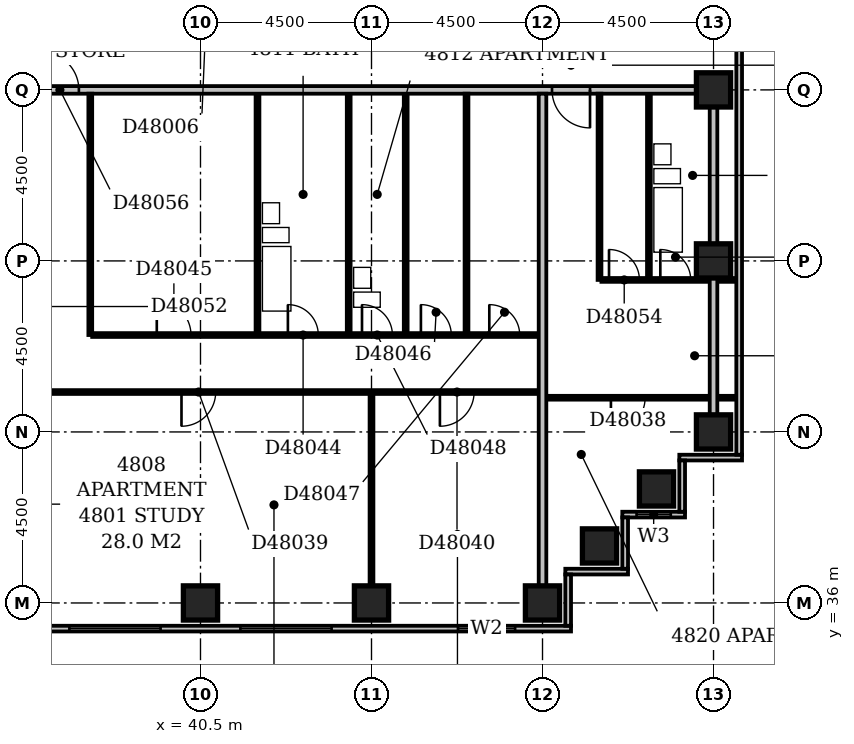
"""IFC4 building model, lengths in metres.
Left out: names, types, materials, properties, quantities, classifications, styles, units other than length and angle.
Written with IfcOpenShell. Run it as: python <this file> out.ifc"""

import sys

from ifc_helpers import new_model, si_unit, direction, frame, frame_2d, origin, origin_2d, place, context, subcontext, project, spatial, rectangle, extrude, element, fill, save


model = new_model("IFC4")
c1 = context("Model", 3, precision=1e-05, world=origin(), true_north=direction((0.0, 1.0)))
c2 = subcontext(c1, "Body", "Model", "MODEL_VIEW")
j1 = project(units=[si_unit("LENGTHUNIT", "METRE"), si_unit("PLANEANGLEUNIT", "RADIAN")], contexts=[c1])
p1 = place(None, origin())
s1 = spatial("IfcSite", under=j1, at=p1, CompositionType="ELEMENT")
p2 = place(p1, origin())
s2 = spatial("IfcBuilding", under=s1, at=p2, CompositionType="ELEMENT")
p3 = place(p2, frame((0.0, 0.0, 189.8)))
s3 = spatial("IfcBuildingStorey", under=s2, at=p3, CompositionType="ELEMENT", Elevation=189.8)
for number, where, z_axis, x_axis in (
    (1, (40.5, 36.0, -0.3), (0.0, 0.0, 1.0), (1.0, 0.0, 0.0)),
    (2, (45.0, 36.0, -0.3), (0.0, 0.0, 1.0), (1.0, 0.0, 0.0)),
    (3, (49.5, 36.0, -0.3), (0.0, 0.0, 1.0), (1.0, 0.0, 0.0)),
    (4, (51.0, 37.5, -0.3), (0.0, 0.0, 1.0), (1.0, 0.0, 0.0)),
    (5, (52.5, 39.0, -0.3), (0.0, 0.0, 1.0), (1.0, 0.0, 0.0)),
    (6, (54.0, 40.5, -0.3), (0.0, 0.0, 1.0), (1.0, 0.0, 0.0)),
    (7, (54.0, 45.0, -0.3), (0.0, 0.0, 1.0), (1.0, 0.0, 0.0)),
    (8, (54.0, 49.5, -0.3), (0.0, 0.0, 1.0), (1.0, 0.0, 0.0)),
):
    element("IfcColumn", number, at=place(p3, frame(where, z_axis=z_axis, x_axis=x_axis)), inside=s3, PredefinedType="COLUMN", context=c2, shape_type="SweptSolid", body=[
        extrude(rectangle(XDim=0.9, YDim=0.9, at=origin_2d()), origin(), (0.0, 0.0, 1.0), 3.6),
    ])
p4 = place(p3, frame((23.1, 35.325, 0.0), z_axis=(0.0, 0.0, 1.0), x_axis=(1.0, 0.0, 0.0)))
e9 = element("IfcWall", 9, at=p4, inside=s3, PredefinedType="STANDARD", context=c2, shape_type="SweptSolid", body=[
    extrude(rectangle(XDim=27.15, YDim=0.15, at=frame_2d((13.575, 0.0))), origin(), (0.0, 0.0, 1.0), 2.7),
])
p5 = place(p4, frame((0.285, 0.0, 0.6)))
e10 = element("IfcOpeningElement", 10, at=p5, cuts=e9, PredefinedType="OPENING", context=c2, shape_type="SweptSolid", body=[
    extrude(rectangle(XDim=2.1, YDim=1.8, at=frame_2d((1.05, 0.9))), frame((0.0, 0.087, 0.0), z_axis=(0.0, -1.0, 0.0), x_axis=(1.0, 0.0, 0.0)), (0.0, 0.0, 1.0), 0.174),
])
p6 = place(p4, frame((4.95, 0.0, 0.6)))
e11 = element("IfcOpeningElement", 11, at=p6, cuts=e9, PredefinedType="OPENING", context=c2, shape_type="SweptSolid", body=[
    extrude(rectangle(XDim=2.4, YDim=1.8, at=frame_2d((1.2, 0.9))), frame((0.0, 0.087, 0.0), z_axis=(0.0, -1.0, 0.0), x_axis=(1.0, 0.0, 0.0)), (0.0, 0.0, 1.0), 0.174),
])
p7 = place(p4, frame((9.45, 0.0, 0.6)))
e12 = element("IfcOpeningElement", 12, at=p7, cuts=e9, PredefinedType="OPENING", context=c2, shape_type="SweptSolid", body=[
    extrude(rectangle(XDim=2.4, YDim=1.8, at=frame_2d((1.2, 0.9))), frame((0.0, 0.087, 0.0), z_axis=(0.0, -1.0, 0.0), x_axis=(1.0, 0.0, 0.0)), (0.0, 0.0, 1.0), 0.174),
])
p8 = place(p4, frame((13.95, 0.0, 0.6)))
e13 = element("IfcOpeningElement", 13, at=p8, cuts=e9, PredefinedType="OPENING", context=c2, shape_type="SweptSolid", body=[
    extrude(rectangle(XDim=2.4, YDim=1.8, at=frame_2d((1.2, 0.9))), frame((0.0, 0.087, 0.0), z_axis=(0.0, -1.0, 0.0), x_axis=(1.0, 0.0, 0.0)), (0.0, 0.0, 1.0), 0.174),
])
p9 = place(p4, frame((18.45, 0.0, 0.6)))
e14 = element("IfcOpeningElement", 14, at=p9, cuts=e9, PredefinedType="OPENING", context=c2, shape_type="SweptSolid", body=[
    extrude(rectangle(XDim=2.4, YDim=1.8, at=frame_2d((1.2, 0.9))), frame((0.0, 0.087, 0.0), z_axis=(0.0, -1.0, 0.0), x_axis=(1.0, 0.0, 0.0)), (0.0, 0.0, 1.0), 0.174),
])
p10 = place(p4, frame((24.179, 0.0, 0.6)))
e15 = element("IfcOpeningElement", 15, at=p10, cuts=e9, PredefinedType="OPENING", context=c2, shape_type="SweptSolid", body=[
    extrude(rectangle(XDim=1.5, YDim=1.8, at=frame_2d((0.75, 0.9))), frame((0.0, 0.087, 0.0), z_axis=(0.0, -1.0, 0.0), x_axis=(1.0, 0.0, 0.0)), (0.0, 0.0, 1.0), 0.174),
])
p11 = place(p3, frame((50.175, 35.4, 0.0), z_axis=(0.0, 0.0, 1.0), x_axis=(0.0, 1.0, 0.0)))
e16 = element("IfcWall", 16, at=p11, inside=s3, PredefinedType="STANDARD", context=c2, shape_type="SweptSolid", body=[
    extrude(rectangle(XDim=1.35, YDim=0.15, at=frame_2d((0.675, 0.0))), origin(), (0.0, 0.0, 1.0), 2.7),
])
p12 = place(p3, frame((50.1, 36.825, 0.0), z_axis=(0.0, 0.0, 1.0), x_axis=(1.0, 0.0, 0.0)))
e17 = element("IfcWall", 17, at=p12, inside=s3, PredefinedType="STANDARD", context=c2, shape_type="SweptSolid", body=[
    extrude(rectangle(XDim=1.65, YDim=0.15, at=frame_2d((0.825, 0.0))), origin(), (0.0, 0.0, 1.0), 2.7),
])
p13 = place(p3, frame((51.675, 36.9, 0.0), z_axis=(0.0, 0.0, 1.0), x_axis=(0.0, 1.0, 0.0)))
e18 = element("IfcWall", 18, at=p13, inside=s3, PredefinedType="STANDARD", context=c2, shape_type="SweptSolid", body=[
    extrude(rectangle(XDim=1.35, YDim=0.15, at=frame_2d((0.675, 0.0))), origin(), (0.0, 0.0, 1.0), 2.7),
])
p14 = place(p3, frame((51.6, 38.325, 0.0), z_axis=(0.0, 0.0, 1.0), x_axis=(1.0, 0.0, 0.0)))
e19 = element("IfcWall", 19, at=p14, inside=s3, PredefinedType="STANDARD", context=c2, shape_type="SweptSolid", body=[
    extrude(rectangle(XDim=1.65, YDim=0.15, at=frame_2d((0.825, 0.0))), origin(), (0.0, 0.0, 1.0), 2.7),
])
p15 = place(p14, frame((0.375, 0.0, 0.6)))
e20 = element("IfcOpeningElement", 20, at=p15, cuts=e19, PredefinedType="OPENING", context=c2, shape_type="SweptSolid", body=[
    extrude(rectangle(XDim=0.9, YDim=1.8, at=frame_2d((0.45, 0.9))), frame((0.0, 0.087, 0.0), z_axis=(0.0, -1.0, 0.0), x_axis=(1.0, 0.0, 0.0)), (0.0, 0.0, 1.0), 0.174),
])
p16 = place(p3, frame((53.175, 38.4, 0.0), z_axis=(0.0, 0.0, 1.0), x_axis=(0.0, 1.0, 0.0)))
e21 = element("IfcWall", 21, at=p16, inside=s3, PredefinedType="STANDARD", context=c2, shape_type="SweptSolid", body=[
    extrude(rectangle(XDim=1.35, YDim=0.15, at=frame_2d((0.675, 0.0))), origin(), (0.0, 0.0, 1.0), 2.7),
])
p17 = place(p3, frame((53.1, 39.825, 0.0), z_axis=(0.0, 0.0, 1.0), x_axis=(1.0, 0.0, 0.0)))
e22 = element("IfcWall", 22, at=p17, inside=s3, PredefinedType="STANDARD", context=c2, shape_type="SweptSolid", body=[
    extrude(rectangle(XDim=1.65, YDim=0.15, at=frame_2d((0.825, 0.0))), origin(), (0.0, 0.0, 1.0), 2.7),
])
p18 = place(p3, frame((54.675, 39.9, 0.0), z_axis=(0.0, 0.0, 1.0), x_axis=(0.0, 1.0, 0.0)))
e23 = element("IfcWall", 23, at=p18, inside=s3, PredefinedType="STANDARD", context=c2, shape_type="SweptSolid", body=[
    extrude(rectangle(XDim=14.85, YDim=0.15, at=frame_2d((7.425, 0.0))), origin(), (0.0, 0.0, 1.0), 2.7),
])
p19 = place(p3, frame((45.0, 36.45, 0.0), z_axis=(0.0, 0.0, 1.0), x_axis=(0.0, 1.0, 0.0)))
e24 = element("IfcWall", 24, at=p19, inside=s3, PredefinedType="PARTITIONING", context=c2, shape_type="SweptSolid", body=[
    extrude(rectangle(XDim=5.05, YDim=0.1, at=frame_2d((2.525, 0.0))), origin(), (0.0, 0.0, 1.0), 2.6),
])
p20 = place(p3, frame((49.5, 36.45, 0.0), z_axis=(0.0, 0.0, 1.0), x_axis=(0.0, 1.0, 0.0)))
e25 = element("IfcWall", 25, at=p20, inside=s3, PredefinedType="PARTITIONING", context=c2, shape_type="SweptSolid", body=[
    extrude(rectangle(XDim=12.95, YDim=0.2, at=frame_2d((6.475, 0.0))), origin(), (0.0, 0.0, 1.0), 3.3),
])
p21 = place(p3, frame((54.0, 40.95, 0.0), z_axis=(0.0, 0.0, 1.0), x_axis=(0.0, 1.0, 0.0)))
e26 = element("IfcWall", 26, at=p21, inside=s3, PredefinedType="PARTITIONING", context=c2, shape_type="SweptSolid", body=[
    extrude(rectangle(XDim=8.1, YDim=0.2, at=frame_2d((4.05, 0.0))), origin(), (0.0, 0.0, 1.0), 2.7),
])
p22 = place(p3, frame((49.6, 41.4, 0.0), z_axis=(0.0, 0.0, 1.0), x_axis=(1.0, 0.0, 0.0)))
e27 = element("IfcWall", 27, at=p22, inside=s3, PredefinedType="PARTITIONING", context=c2, shape_type="SweptSolid", body=[
    extrude(rectangle(XDim=5.0, YDim=0.1, at=frame_2d((2.5, 0.0))), origin(), (0.0, 0.0, 1.0), 3.3),
])
p23 = place(p22, frame((1.7, 0.0, 0.0)))
e28 = element("IfcOpeningElement", 28, at=p23, cuts=e27, PredefinedType="OPENING", context=c2, shape_type="SweptSolid", body=[
    extrude(rectangle(XDim=0.9, YDim=2.1, at=frame_2d((0.45, 1.05))), frame((0.0, 0.062, 0.0), z_axis=(0.0, -1.0, 0.0), x_axis=(1.0, 0.0, 0.0)), (0.0, 0.0, 1.0), 0.124),
])
p24 = place(p3, frame((36.1, 41.55, 0.0), z_axis=(0.0, 0.0, 1.0), x_axis=(1.0, 0.0, 0.0)))
e29 = element("IfcWall", 29, at=p24, inside=s3, PredefinedType="PARTITIONING", context=c2, shape_type="SweptSolid", body=[
    extrude(rectangle(XDim=13.3, YDim=0.1, at=frame_2d((6.65, 0.0))), origin(), (0.0, 0.0, 1.0), 3.3),
])
p25 = place(p24, frame((3.9, 0.0, 0.0)))
e30 = element("IfcOpeningElement", 30, at=p25, cuts=e29, PredefinedType="OPENING", context=c2, shape_type="SweptSolid", body=[
    extrude(rectangle(XDim=0.9, YDim=2.1, at=frame_2d((0.45, 1.05))), frame((0.0, 0.062, 0.0), z_axis=(0.0, -1.0, 0.0), x_axis=(1.0, 0.0, 0.0)), (0.0, 0.0, 1.0), 0.124),
])
p26 = place(p24, frame((10.7, 0.0, 0.0)))
e31 = element("IfcOpeningElement", 31, at=p26, cuts=e29, PredefinedType="OPENING", context=c2, shape_type="SweptSolid", body=[
    extrude(rectangle(XDim=0.9, YDim=2.1, at=frame_2d((0.45, 1.05))), frame((0.0, 0.062, 0.0), z_axis=(0.0, -1.0, 0.0), x_axis=(1.0, 0.0, 0.0)), (0.0, 0.0, 1.0), 0.124),
])
p27 = place(p3, frame((37.6, 43.05, 0.0), z_axis=(0.0, 0.0, 1.0), x_axis=(0.0, 1.0, 0.0)))
e32 = element("IfcWall", 32, at=p27, inside=s3, PredefinedType="PARTITIONING", context=c2, shape_type="SweptSolid", body=[
    extrude(rectangle(XDim=6.35, YDim=0.1, at=frame_2d((3.175, 0.0))), origin(), (0.0, 0.0, 1.0), 3.3),
])
p28 = place(p3, frame((37.65, 43.05, 0.0), z_axis=(0.0, 0.0, 1.0), x_axis=(1.0, 0.0, 0.0)))
e33 = element("IfcWall", 33, at=p28, inside=s3, PredefinedType="PARTITIONING", context=c2, shape_type="SweptSolid", body=[
    extrude(rectangle(XDim=11.75, YDim=0.1, at=frame_2d((5.875, 0.0))), origin(), (0.0, 0.0, 1.0), 3.3),
])
p29 = place(p28, frame((5.15, 0.0, 0.0)))
e34 = element("IfcOpeningElement", 34, at=p29, cuts=e33, PredefinedType="OPENING", context=c2, shape_type="SweptSolid", body=[
    extrude(rectangle(XDim=0.8, YDim=2.1, at=frame_2d((0.4, 1.05))), frame((0.0, 0.062, 0.0), z_axis=(0.0, -1.0, 0.0), x_axis=(1.0, 0.0, 0.0)), (0.0, 0.0, 1.0), 0.124),
])
p30 = place(p28, frame((1.7, 0.0, 0.0)))
e35 = element("IfcOpeningElement", 35, at=p30, cuts=e33, PredefinedType="OPENING", context=c2, shape_type="SweptSolid", body=[
    extrude(rectangle(XDim=0.9, YDim=2.1, at=frame_2d((0.45, 1.05))), frame((0.0, 0.062, 0.0), z_axis=(0.0, -1.0, 0.0), x_axis=(1.0, 0.0, 0.0)), (0.0, 0.0, 1.0), 0.124),
])
p31 = place(p28, frame((8.65, 0.0, 0.0)))
e36 = element("IfcOpeningElement", 36, at=p31, cuts=e33, PredefinedType="OPENING", context=c2, shape_type="SweptSolid", body=[
    extrude(rectangle(XDim=0.8, YDim=2.1, at=frame_2d((0.4, 1.05))), frame((0.0, 0.062, 0.0), z_axis=(0.0, -1.0, 0.0), x_axis=(1.0, 0.0, 0.0)), (0.0, 0.0, 1.0), 0.124),
])
p32 = place(p28, frame((10.45, 0.0, 0.0)))
e37 = element("IfcOpeningElement", 37, at=p32, cuts=e33, PredefinedType="OPENING", context=c2, shape_type="SweptSolid", body=[
    extrude(rectangle(XDim=0.8, YDim=2.1, at=frame_2d((0.4, 1.05))), frame((0.0, 0.062, 0.0), z_axis=(0.0, -1.0, 0.0), x_axis=(1.0, 0.0, 0.0)), (0.0, 0.0, 1.0), 0.124),
])
p33 = place(p28, frame((7.1, 0.0, 0.0)))
e38 = element("IfcOpeningElement", 38, at=p33, cuts=e33, PredefinedType="OPENING", context=c2, shape_type="SweptSolid", body=[
    extrude(rectangle(XDim=0.8, YDim=2.1, at=frame_2d((0.4, 1.05))), frame((0.0, 0.062, 0.0), z_axis=(0.0, -1.0, 0.0), x_axis=(1.0, 0.0, 0.0)), (0.0, 0.0, 1.0), 0.124),
])
p34 = place(p3, frame((42.0, 43.1, 0.0), z_axis=(0.0, 0.0, 1.0), x_axis=(0.0, 1.0, 0.0)))
e39 = element("IfcWall", 39, at=p34, inside=s3, PredefinedType="PLUMBINGWALL", context=c2, shape_type="SweptSolid", body=[
    extrude(rectangle(XDim=6.3, YDim=0.1, at=frame_2d((3.15, 0.0))), origin(), (0.0, 0.0, 1.0), 3.3),
])
p35 = place(p3, frame((44.4, 43.1, 0.0), z_axis=(0.0, 0.0, 1.0), x_axis=(0.0, 1.0, 0.0)))
e40 = element("IfcWall", 40, at=p35, inside=s3, PredefinedType="PLUMBINGWALL", context=c2, shape_type="SweptSolid", body=[
    extrude(rectangle(XDim=6.3, YDim=0.1, at=frame_2d((3.15, 0.0))), origin(), (0.0, 0.0, 1.0), 2.6),
])
p36 = place(p3, frame((45.9, 43.1, 0.0), z_axis=(0.0, 0.0, 1.0), x_axis=(0.0, 1.0, 0.0)))
e41 = element("IfcWall", 41, at=p36, inside=s3, PredefinedType="PLUMBINGWALL", context=c2, shape_type="SweptSolid", body=[
    extrude(rectangle(XDim=6.3, YDim=0.1, at=frame_2d((3.15, 0.0))), origin(), (0.0, 0.0, 1.0), 3.3),
])
p37 = place(p3, frame((47.5, 43.1, 0.0), z_axis=(0.0, 0.0, 1.0), x_axis=(0.0, 1.0, 0.0)))
e42 = element("IfcWall", 42, at=p37, inside=s3, PredefinedType="PARTITIONING", context=c2, shape_type="SweptSolid", body=[
    extrude(rectangle(XDim=6.3, YDim=0.1, at=frame_2d((3.15, 0.0))), origin(), (0.0, 0.0, 1.0), 3.3),
])
p38 = place(p3, frame((51.0, 44.5, 0.0), z_axis=(0.0, 0.0, 1.0), x_axis=(0.0, 1.0, 0.0)))
e43 = element("IfcWall", 43, at=p38, inside=s3, PredefinedType="PARTITIONING", context=c2, shape_type="SweptSolid", body=[
    extrude(rectangle(XDim=4.9, YDim=0.1, at=frame_2d((2.45, 0.0))), origin(), (0.0, 0.0, 1.0), 3.3),
])
p39 = place(p3, frame((51.05, 44.5, 0.0), z_axis=(0.0, 0.0, 1.0), x_axis=(1.0, 0.0, 0.0)))
e44 = element("IfcWall", 44, at=p39, inside=s3, PredefinedType="PARTITIONING", context=c2, shape_type="SweptSolid", body=[
    extrude(rectangle(XDim=3.55, YDim=0.1, at=frame_2d((1.775, 0.0))), origin(), (0.0, 0.0, 1.0), 3.3),
])
p40 = place(p39, frame((1.55, 0.0, 0.0)))
e45 = element("IfcOpeningElement", 45, at=p40, cuts=e44, PredefinedType="OPENING", context=c2, shape_type="SweptSolid", body=[
    extrude(rectangle(XDim=0.8, YDim=2.1, at=frame_2d((0.4, 1.05))), frame((0.0, 0.062, 0.0), z_axis=(0.0, -1.0, 0.0), x_axis=(1.0, 0.0, 0.0)), (0.0, 0.0, 1.0), 0.124),
])
p41 = place(p39, frame((0.2, 0.0, 0.0)))
e46 = element("IfcOpeningElement", 46, at=p41, cuts=e44, PredefinedType="OPENING", context=c2, shape_type="SweptSolid", body=[
    extrude(rectangle(XDim=0.8, YDim=2.1, at=frame_2d((0.4, 1.05))), frame((0.0, 0.062, 0.0), z_axis=(0.0, -1.0, 0.0), x_axis=(1.0, 0.0, 0.0)), (0.0, 0.0, 1.0), 0.124),
])
p42 = place(p3, frame((52.3, 44.55, 0.0), z_axis=(0.0, 0.0, 1.0), x_axis=(0.0, 1.0, 0.0)))
e47 = element("IfcWall", 47, at=p42, inside=s3, PredefinedType="PLUMBINGWALL", context=c2, shape_type="SweptSolid", body=[
    extrude(rectangle(XDim=4.85, YDim=0.1, at=frame_2d((2.425, 0.0))), origin(), (0.0, 0.0, 1.0), 3.3),
])
p43 = place(p3, frame((22.6, 49.5, 0.0), z_axis=(0.0, 0.0, 1.0), x_axis=(1.0, 0.0, 0.0)))
e48 = element("IfcWall", 48, at=p43, inside=s3, PredefinedType="PARTITIONING", context=c2, shape_type="SweptSolid", body=[
    extrude(rectangle(XDim=30.95, YDim=0.2, at=frame_2d((15.475, 0.0))), origin(), (0.0, 0.0, 1.0), 3.3),
])
p44 = place(p43, frame((6.1, 0.0, 0.0)))
e49 = element("IfcOpeningElement", 49, at=p44, cuts=e48, PredefinedType="OPENING", context=c2, shape_type="SweptSolid", body=[
    extrude(rectangle(XDim=1.0, YDim=2.1, at=frame_2d((0.5, 1.05))), frame((0.0, 0.112, 0.0), z_axis=(0.0, -1.0, 0.0), x_axis=(1.0, 0.0, 0.0)), (0.0, 0.0, 1.0), 0.224),
])
p45 = place(p43, frame((13.7, 0.0, 0.0)))
e50 = element("IfcOpeningElement", 50, at=p45, cuts=e48, PredefinedType="OPENING", context=c2, shape_type="SweptSolid", body=[
    extrude(rectangle(XDim=1.0, YDim=2.1, at=frame_2d((0.5, 1.05))), frame((0.0, 0.112, 0.0), z_axis=(0.0, -1.0, 0.0), x_axis=(1.0, 0.0, 0.0)), (0.0, 0.0, 1.0), 0.224),
])
p46 = place(p43, frame((27.15, 0.0, 0.0)))
e51 = element("IfcOpeningElement", 51, at=p46, cuts=e48, PredefinedType="OPENING", context=c2, shape_type="SweptSolid", body=[
    extrude(rectangle(XDim=1.0, YDim=2.1, at=frame_2d((0.5, 1.05))), frame((0.0, 0.112, 0.0), z_axis=(0.0, -1.0, 0.0), x_axis=(1.0, 0.0, 0.0)), (0.0, 0.0, 1.0), 0.224),
])
p47 = place(p8, origin())
e52 = element("IfcWindow", 52, at=p47, inside=s3, PartitioningType="SINGLE_PANEL", PredefinedType="WINDOW", context=c2, shape_type="SweptSolid", body=[
    extrude(rectangle(XDim=2.4, YDim=1.8, at=frame_2d((1.2, 0.9))), frame((0.0, 0.03, 0.0), z_axis=(0.0, -1.0, 0.0), x_axis=(1.0, 0.0, 0.0)), (0.0, 0.0, 1.0), 0.06),
])
fill(e13, e52)
p48 = place(p9, origin())
e53 = element("IfcWindow", 53, at=p48, inside=s3, PartitioningType="SINGLE_PANEL", PredefinedType="WINDOW", context=c2, shape_type="SweptSolid", body=[
    extrude(rectangle(XDim=2.4, YDim=1.8, at=frame_2d((1.2, 0.9))), frame((0.0, 0.03, 0.0), z_axis=(0.0, -1.0, 0.0), x_axis=(1.0, 0.0, 0.0)), (0.0, 0.0, 1.0), 0.06),
])
fill(e14, e53)
p49 = place(p10, origin())
e54 = element("IfcWindow", 54, at=p49, inside=s3, PartitioningType="SINGLE_PANEL", PredefinedType="WINDOW", context=c2, shape_type="SweptSolid", body=[
    extrude(rectangle(XDim=1.5, YDim=1.8, at=frame_2d((0.75, 0.9))), frame((0.0, 0.03, 0.0), z_axis=(0.0, -1.0, 0.0), x_axis=(1.0, 0.0, 0.0)), (0.0, 0.0, 1.0), 0.06),
])
fill(e15, e54)
p50 = place(p15, origin())
e55 = element("IfcWindow", 55, at=p50, inside=s3, PartitioningType="SINGLE_PANEL", PredefinedType="WINDOW", context=c2, shape_type="SweptSolid", body=[
    extrude(rectangle(XDim=0.9, YDim=1.8, at=frame_2d((0.45, 0.9))), frame((0.0, 0.03, 0.0), z_axis=(0.0, -1.0, 0.0), x_axis=(1.0, 0.0, 0.0)), (0.0, 0.0, 1.0), 0.06),
])
fill(e20, e55)
p51 = place(p23, frame((0.9, 0.0, 0.0), z_axis=(0.0, 0.0, 1.0), x_axis=(-1.0, 0.0, 0.0)))
e56 = element("IfcDoor", 56, at=p51, inside=s3, OperationType="SINGLE_SWING_RIGHT", PredefinedType="DOOR", context=c2, shape_type="SweptSolid", body=[
    extrude(rectangle(XDim=0.9, YDim=2.1, at=frame_2d((0.45, 1.05))), frame((0.0, 0.025, 0.0), z_axis=(0.0, -1.0, 0.0), x_axis=(1.0, 0.0, 0.0)), (0.0, 0.0, 1.0), 0.05),
])
fill(e28, e56)
p52 = place(p25, frame((0.9, 0.0, 0.0), z_axis=(0.0, 0.0, 1.0), x_axis=(-1.0, 0.0, 0.0)))
e57 = element("IfcDoor", 57, at=p52, inside=s3, OperationType="SINGLE_SWING_RIGHT", PredefinedType="DOOR", context=c2, shape_type="SweptSolid", body=[
    extrude(rectangle(XDim=0.9, YDim=2.1, at=frame_2d((0.45, 1.05))), frame((0.0, 0.025, 0.0), z_axis=(0.0, -1.0, 0.0), x_axis=(1.0, 0.0, 0.0)), (0.0, 0.0, 1.0), 0.05),
])
fill(e30, e57)
p53 = place(p26, frame((0.9, 0.0, 0.0), z_axis=(0.0, 0.0, 1.0), x_axis=(-1.0, 0.0, 0.0)))
e58 = element("IfcDoor", 58, at=p53, inside=s3, OperationType="SINGLE_SWING_RIGHT", PredefinedType="DOOR", context=c2, shape_type="SweptSolid", body=[
    extrude(rectangle(XDim=0.9, YDim=2.1, at=frame_2d((0.45, 1.05))), frame((0.0, 0.025, 0.0), z_axis=(0.0, -1.0, 0.0), x_axis=(1.0, 0.0, 0.0)), (0.0, 0.0, 1.0), 0.05),
])
fill(e31, e58)
p54 = place(p29, origin())
e59 = element("IfcDoor", 59, at=p54, inside=s3, OperationType="SINGLE_SWING_LEFT", PredefinedType="DOOR", context=c2, shape_type="SweptSolid", body=[
    extrude(rectangle(XDim=0.8, YDim=2.1, at=frame_2d((0.4, 1.05))), frame((0.0, 0.025, 0.0), z_axis=(0.0, -1.0, 0.0), x_axis=(1.0, 0.0, 0.0)), (0.0, 0.0, 1.0), 0.05),
])
fill(e34, e59)
p55 = place(p30, origin())
e60 = element("IfcDoor", 60, at=p55, inside=s3, OperationType="SINGLE_SWING_LEFT", PredefinedType="DOOR", context=c2, shape_type="SweptSolid", body=[
    extrude(rectangle(XDim=0.9, YDim=2.1, at=frame_2d((0.45, 1.05))), frame((0.0, 0.025, 0.0), z_axis=(0.0, -1.0, 0.0), x_axis=(1.0, 0.0, 0.0)), (0.0, 0.0, 1.0), 0.05),
])
fill(e35, e60)
p56 = place(p31, origin())
e61 = element("IfcDoor", 61, at=p56, inside=s3, OperationType="SINGLE_SWING_LEFT", PredefinedType="DOOR", context=c2, shape_type="SweptSolid", body=[
    extrude(rectangle(XDim=0.8, YDim=2.1, at=frame_2d((0.4, 1.05))), frame((0.0, 0.025, 0.0), z_axis=(0.0, -1.0, 0.0), x_axis=(1.0, 0.0, 0.0)), (0.0, 0.0, 1.0), 0.05),
])
fill(e36, e61)
p57 = place(p32, origin())
e62 = element("IfcDoor", 62, at=p57, inside=s3, OperationType="SINGLE_SWING_LEFT", PredefinedType="DOOR", context=c2, shape_type="SweptSolid", body=[
    extrude(rectangle(XDim=0.8, YDim=2.1, at=frame_2d((0.4, 1.05))), frame((0.0, 0.025, 0.0), z_axis=(0.0, -1.0, 0.0), x_axis=(1.0, 0.0, 0.0)), (0.0, 0.0, 1.0), 0.05),
])
fill(e37, e62)
p58 = place(p33, origin())
e63 = element("IfcDoor", 63, at=p58, inside=s3, OperationType="SINGLE_SWING_LEFT", PredefinedType="DOOR", context=c2, shape_type="SweptSolid", body=[
    extrude(rectangle(XDim=0.8, YDim=2.1, at=frame_2d((0.4, 1.05))), frame((0.0, 0.025, 0.0), z_axis=(0.0, -1.0, 0.0), x_axis=(1.0, 0.0, 0.0)), (0.0, 0.0, 1.0), 0.05),
])
fill(e38, e63)
p59 = place(p40, origin())
e64 = element("IfcDoor", 64, at=p59, inside=s3, OperationType="SINGLE_SWING_LEFT", PredefinedType="DOOR", context=c2, shape_type="SweptSolid", body=[
    extrude(rectangle(XDim=0.8, YDim=2.1, at=frame_2d((0.4, 1.05))), frame((0.0, 0.025, 0.0), z_axis=(0.0, -1.0, 0.0), x_axis=(1.0, 0.0, 0.0)), (0.0, 0.0, 1.0), 0.05),
])
fill(e45, e64)
p60 = place(p41, origin())
e65 = element("IfcDoor", 65, at=p60, inside=s3, OperationType="SINGLE_SWING_LEFT", PredefinedType="DOOR", context=c2, shape_type="SweptSolid", body=[
    extrude(rectangle(XDim=0.8, YDim=2.1, at=frame_2d((0.4, 1.05))), frame((0.0, 0.025, 0.0), z_axis=(0.0, -1.0, 0.0), x_axis=(1.0, 0.0, 0.0)), (0.0, 0.0, 1.0), 0.05),
])
fill(e46, e65)
p61 = place(p45, origin())
e66 = element("IfcDoor", 66, at=p61, inside=s3, OperationType="SINGLE_SWING_LEFT", PredefinedType="DOOR", context=c2, shape_type="SweptSolid", body=[
    extrude(rectangle(XDim=1.0, YDim=2.1, at=frame_2d((0.5, 1.05))), frame((0.0, 0.025, 0.0), z_axis=(0.0, -1.0, 0.0), x_axis=(1.0, 0.0, 0.0)), (0.0, 0.0, 1.0), 0.05),
])
fill(e50, e66)
p62 = place(p46, origin())
e67 = element("IfcDoor", 67, at=p62, inside=s3, OperationType="SINGLE_SWING_RIGHT", PredefinedType="DOOR", context=c2, shape_type="SweptSolid", body=[
    extrude(rectangle(XDim=1.0, YDim=2.1, at=frame_2d((0.5, 1.05))), frame((0.0, 0.025, 0.0), z_axis=(0.0, -1.0, 0.0), x_axis=(1.0, 0.0, 0.0)), (0.0, 0.0, 1.0), 0.05),
])
fill(e51, e67)
save(model, sys.argv[1])
